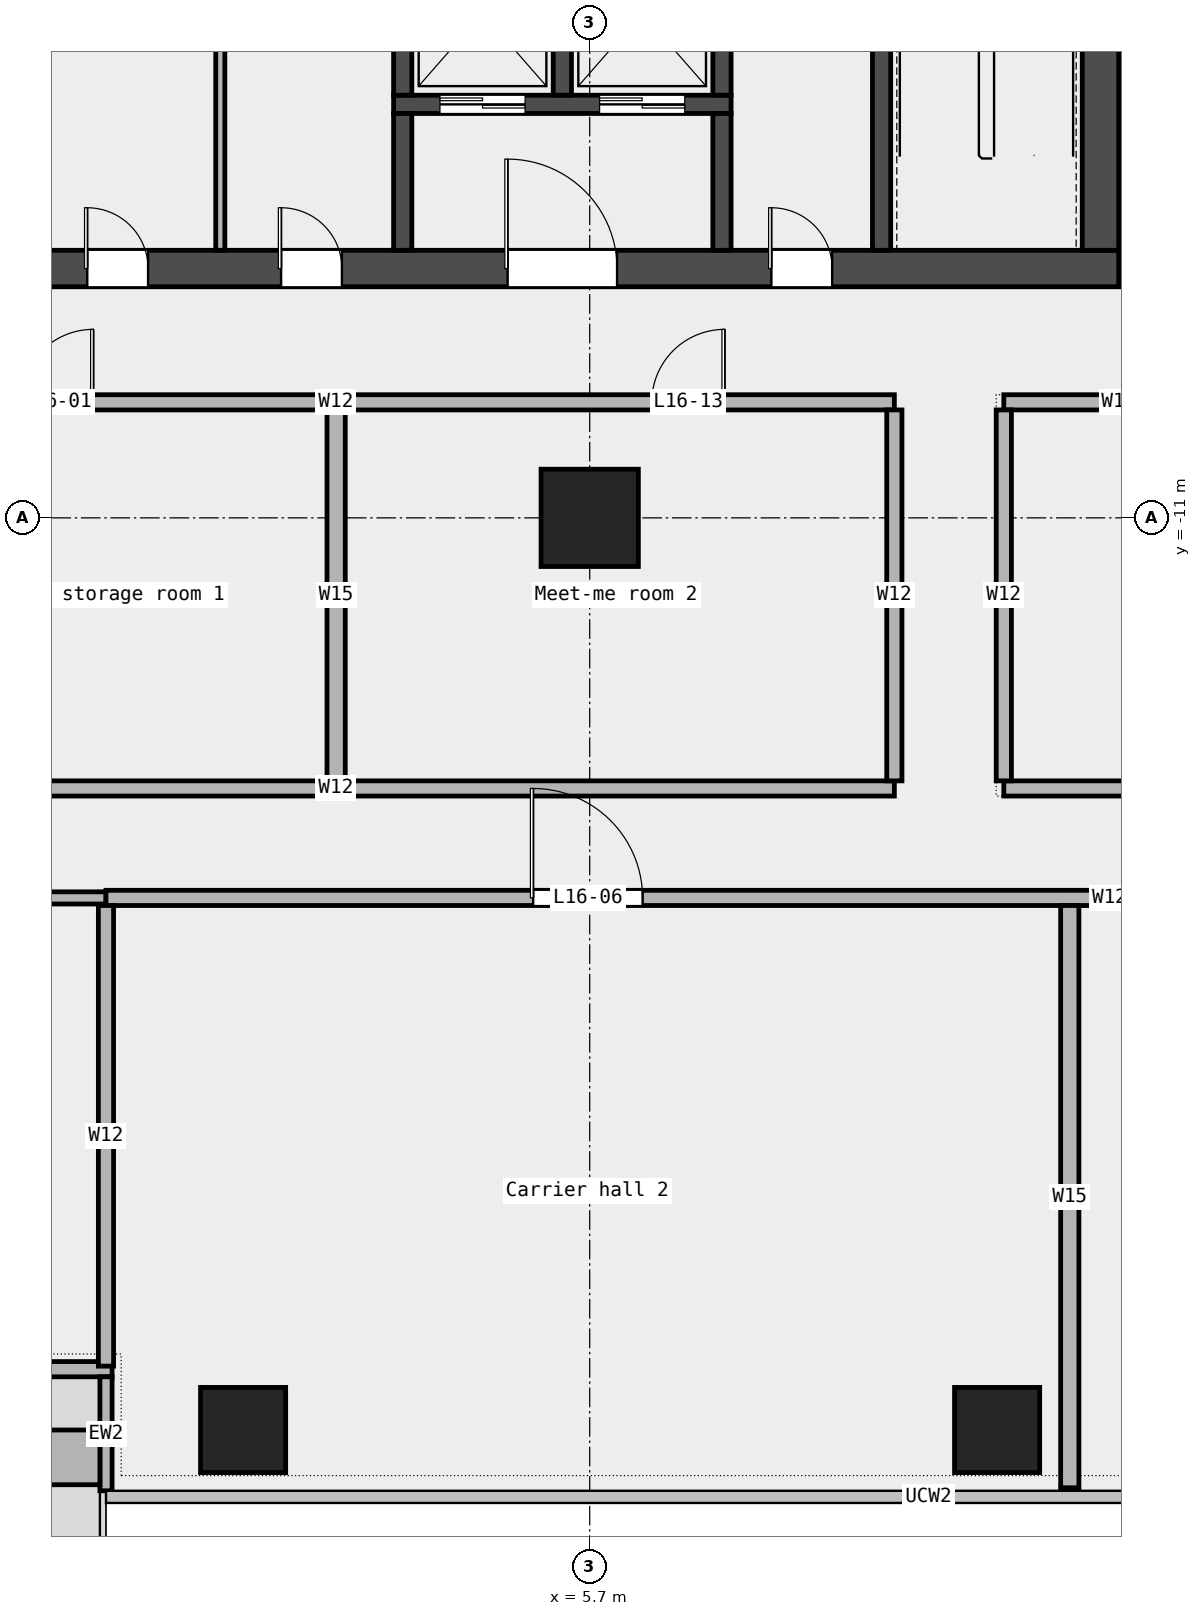
"""IFC4 building model, lengths in metres.
Left out: names, types, materials, properties, quantities, classifications, styles, units other than length and angle.
Written with IfcOpenShell. Run it as: python <this file> out.ifc"""

import sys

from ifc_helpers import new_model, si_unit, direction, frame, frame_2d, origin, origin_2d, place, context, subcontext, project, spatial, rectangle, extrude, element, fill, save


model = new_model("IFC4")
c1 = context("Model", 3, precision=1e-05, world=origin(), true_north=direction((0.0, 1.0)))
c2 = subcontext(c1, "Body", "Model", "MODEL_VIEW")
j1 = project(units=[si_unit("LENGTHUNIT", "METRE"), si_unit("PLANEANGLEUNIT", "RADIAN")], contexts=[c1])
p1 = place(None, origin())
s1 = spatial("IfcSite", under=j1, at=p1, CompositionType="ELEMENT")
p2 = place(p1, origin())
s2 = spatial("IfcBuilding", under=s1, at=p2, CompositionType="ELEMENT")
p3 = place(p2, frame((0.0, 0.0, 83.8)))
s3 = spatial("IfcBuildingStorey", under=s2, at=p3, CompositionType="ELEMENT", Elevation=83.8)
for number, where, z_axis, x_axis in (
    (1, (0.0, -26.0, 0.0), (0.0, 0.0, 1.0), (1.0, 0.0, 0.0)),
    (2, (12.4, -26.0, 0.0), (0.0, 0.0, 1.0), (1.0, 0.0, 0.0)),
):
    element("IfcColumn", number, at=place(p3, frame(where, z_axis=z_axis, x_axis=x_axis)), inside=s3, PredefinedType="COLUMN", context=c2, shape_type="SweptSolid", body=[
        extrude(rectangle(XDim=1.4, YDim=1.4, at=origin_2d()), origin(), (0.0, 0.0, 1.0), 4.2),
    ])
p4 = place(p3, frame((5.7, -11.0, 0.0), z_axis=(0.0, 0.0, 1.0), x_axis=(1.0, 0.0, 0.0)))
e3 = element("IfcColumn", 3, at=p4, inside=s3, PredefinedType="COLUMN", context=c2, shape_type="SweptSolid", body=[
    extrude(rectangle(XDim=1.6, YDim=1.6, at=origin_2d()), origin(), (0.0, 0.0, 1.0), 4.2),
])
p5 = place(p3, frame((-15.882, -25.0, 0.0), z_axis=(0.0, 0.0, 1.0), x_axis=(1.0, 0.0, 0.0)))
e4 = element("IfcWall", 4, at=p5, inside=s3, PredefinedType="STANDARD", context=c2, shape_type="SweptSolid", body=[
    extrude(rectangle(XDim=13.727, YDim=0.25, at=frame_2d((6.864, 0.0))), origin(), (0.0, 0.0, 1.0), 4.2),
])
p6 = place(p5, frame((1.0, 0.0, 0.45)))
e5 = element("IfcOpeningElement", 5, at=p6, cuts=e4, PredefinedType="OPENING", context=c2, shape_type="SweptSolid", body=[
    extrude(rectangle(XDim=1.5, YDim=3.0, at=frame_2d((0.75, 1.5))), frame((0.0, 0.137, 0.0), z_axis=(0.0, -1.0, 0.0), x_axis=(1.0, 0.0, 0.0)), (0.0, 0.0, 1.0), 0.274),
])
p7 = place(p5, frame((6.0, 0.0, 0.0)))
e6 = element("IfcOpeningElement", 6, at=p7, cuts=e4, PredefinedType="OPENING", context=c2, shape_type="SweptSolid", body=[
    extrude(rectangle(XDim=1.8, YDim=2.4, at=frame_2d((0.9, 1.2))), frame((0.0, 0.137, 0.0), z_axis=(0.0, -1.0, 0.0), x_axis=(1.0, 0.0, 0.0)), (0.0, 0.0, 1.0), 0.274),
])
p8 = place(p5, frame((10.5, 0.0, 0.45)))
e7 = element("IfcOpeningElement", 7, at=p8, cuts=e4, PredefinedType="OPENING", context=c2, shape_type="SweptSolid", body=[
    extrude(rectangle(XDim=1.5, YDim=3.0, at=frame_2d((0.75, 1.5))), frame((0.0, 0.137, 0.0), z_axis=(0.0, -1.0, 0.0), x_axis=(1.0, 0.0, 0.0)), (0.0, 0.0, 1.0), 0.274),
])
p9 = place(p3, frame((-2.255, -27.0, 0.0), z_axis=(0.0, 0.0, 1.0), x_axis=(0.0, 1.0, 0.0)))
e8 = element("IfcWall", 8, at=p9, inside=s3, PredefinedType="STANDARD", context=c2, shape_type="SweptSolid", body=[
    extrude(rectangle(XDim=1.875, YDim=0.2, at=frame_2d((0.938, 0.0))), origin(), (0.0, 0.0, 1.0), 4.2),
])
p10 = place(p3, frame((-5.955, -26.45, 0.0), z_axis=(0.0, 0.0, 1.0), x_axis=(1.0, 0.0, 0.0)))
e9 = element("IfcWall", 9, at=p10, inside=s3, PredefinedType="STANDARD", context=c2, shape_type="SweptSolid", body=[
    extrude(rectangle(XDim=3.6, YDim=0.9, at=frame_2d((1.8, 0.0))), origin(), (0.0, 0.0, 1.0), 0.7),
])
p11 = place(p3, frame((-15.78, -17.25, 0.0), z_axis=(0.0, 0.0, 1.0), x_axis=(1.0, 0.0, 0.0)))
e10 = element("IfcWall", 10, at=p11, inside=s3, PredefinedType="PARTITIONING", context=c2, shape_type="SweptSolid", body=[
    extrude(rectangle(XDim=13.525, YDim=0.2, at=frame_2d((6.763, 0.0))), origin(), (0.0, 0.0, 1.0), 4.2),
])
p12 = place(p11, frame((6.012, 0.0, 0.0)))
e11 = element("IfcOpeningElement", 11, at=p12, cuts=e10, PredefinedType="OPENING", context=c2, shape_type="SweptSolid", body=[
    extrude(rectangle(XDim=1.5, YDim=2.1, at=frame_2d((0.75, 1.05))), frame((0.0, 0.112, 0.0), z_axis=(0.0, -1.0, 0.0), x_axis=(1.0, 0.0, 0.0)), (0.0, 0.0, 1.0), 0.224),
])
p13 = place(p3, frame((-2.255, -17.25, 0.0), z_axis=(0.0, 0.0, 1.0), x_axis=(1.0, 0.0, 0.0)))
e12 = element("IfcWall", 12, at=p13, inside=s3, PredefinedType="PARTITIONING", context=c2, shape_type="SweptSolid", body=[
    extrude(rectangle(XDim=33.005, YDim=0.25, at=frame_2d((16.502, 0.0))), origin(), (0.0, 0.0, 1.0), 4.2),
])
p14 = place(p13, frame((7.025, 0.0, 0.0)))
e13 = element("IfcOpeningElement", 13, at=p14, cuts=e12, PredefinedType="OPENING", context=c2, shape_type="SweptSolid", body=[
    extrude(rectangle(XDim=1.8, YDim=2.1, at=frame_2d((0.9, 1.05))), frame((0.0, 0.137, 0.0), z_axis=(0.0, -1.0, 0.0), x_axis=(1.0, 0.0, 0.0)), (0.0, 0.0, 1.0), 0.274),
])
p15 = place(p13, frame((23.427, 0.0, 0.0)))
e14 = element("IfcOpeningElement", 14, at=p15, cuts=e12, PredefinedType="OPENING", context=c2, shape_type="SweptSolid", body=[
    extrude(rectangle(XDim=1.8, YDim=2.1, at=frame_2d((0.9, 1.05))), frame((0.0, 0.137, 0.0), z_axis=(0.0, -1.0, 0.0), x_axis=(1.0, 0.0, 0.0)), (0.0, 0.0, 1.0), 0.274),
])
p16 = place(p3, frame((-7.655, -15.45, 0.0), z_axis=(0.0, 0.0, 1.0), x_axis=(1.0, 0.0, 0.0)))
e15 = element("IfcWall", 15, at=p16, inside=s3, PredefinedType="PARTITIONING", context=c2, shape_type="SweptSolid", body=[
    extrude(rectangle(XDim=18.365, YDim=0.25, at=frame_2d((9.183, 0.0))), origin(), (0.0, 0.0, 1.0), 4.2),
])
p17 = place(p3, frame((12.51, -15.45, 0.0), z_axis=(0.0, 0.0, 1.0), x_axis=(1.0, 0.0, 0.0)))
e16 = element("IfcWall", 16, at=p17, inside=s3, PredefinedType="PARTITIONING", context=c2, shape_type="SweptSolid", body=[
    extrude(rectangle(XDim=18.24, YDim=0.25, at=frame_2d((9.12, 0.0))), origin(), (0.0, 0.0, 1.0), 4.2),
])
p18 = place(p17, frame((12.93, 0.0, 0.0)))
e17 = element("IfcOpeningElement", 17, at=p18, cuts=e16, PredefinedType="OPENING", context=c2, shape_type="SweptSolid", body=[
    extrude(rectangle(XDim=1.2, YDim=2.1, at=frame_2d((0.6, 1.05))), frame((0.0, 0.137, 0.0), z_axis=(0.0, -1.0, 0.0), x_axis=(1.0, 0.0, 0.0)), (0.0, 0.0, 1.0), 0.274),
])
p19 = place(p17, frame((3.91, 0.0, 0.0)))
e18 = element("IfcOpeningElement", 18, at=p19, cuts=e16, PredefinedType="OPENING", context=c2, shape_type="SweptSolid", body=[
    extrude(rectangle(XDim=1.2, YDim=2.1, at=frame_2d((0.6, 1.05))), frame((0.0, 0.137, 0.0), z_axis=(0.0, -1.0, 0.0), x_axis=(1.0, 0.0, 0.0)), (0.0, 0.0, 1.0), 0.274),
])
p20 = place(p3, frame((-7.655, -9.1, 0.0), z_axis=(0.0, 0.0, 1.0), x_axis=(1.0, 0.0, 0.0)))
e19 = element("IfcWall", 19, at=p20, inside=s3, PredefinedType="PARTITIONING", context=c2, shape_type="SweptSolid", body=[
    extrude(rectangle(XDim=18.365, YDim=0.25, at=frame_2d((9.183, 0.0))), origin(), (0.0, 0.0, 1.0), 4.2),
])
p21 = place(p20, frame((3.992, 0.0, 0.0)))
e20 = element("IfcOpeningElement", 20, at=p21, cuts=e19, PredefinedType="OPENING", context=c2, shape_type="SweptSolid", body=[
    extrude(rectangle(XDim=1.2, YDim=2.1, at=frame_2d((0.6, 1.05))), frame((0.0, 0.137, 0.0), z_axis=(0.0, -1.0, 0.0), x_axis=(1.0, 0.0, 0.0)), (0.0, 0.0, 1.0), 0.274),
])
p22 = place(p20, frame((14.375, 0.0, 0.0)))
e21 = element("IfcOpeningElement", 21, at=p22, cuts=e19, PredefinedType="OPENING", context=c2, shape_type="SweptSolid", body=[
    extrude(rectangle(XDim=1.2, YDim=2.1, at=frame_2d((0.6, 1.05))), frame((0.0, 0.137, 0.0), z_axis=(0.0, -1.0, 0.0), x_axis=(1.0, 0.0, 0.0)), (0.0, 0.0, 1.0), 0.274),
])
p23 = place(p3, frame((12.51, -9.1, 0.0), z_axis=(0.0, 0.0, 1.0), x_axis=(1.0, 0.0, 0.0)))
e22 = element("IfcWall", 22, at=p23, inside=s3, PredefinedType="PARTITIONING", context=c2, shape_type="SweptSolid", body=[
    extrude(rectangle(XDim=3.79, YDim=0.25, at=frame_2d((1.895, 0.0))), origin(), (0.0, 0.0, 1.0), 4.2),
])
p24 = place(p3, frame((-2.255, -24.95, 0.0), z_axis=(0.0, 0.0, 1.0), x_axis=(0.0, 1.0, 0.0)))
e23 = element("IfcWall", 23, at=p24, inside=s3, PredefinedType="PARTITIONING", context=c2, shape_type="SweptSolid", body=[
    extrude(rectangle(XDim=7.575, YDim=0.25, at=frame_2d((3.788, 0.0))), origin(), (0.0, 0.0, 1.0), 4.2),
])
p25 = place(p3, frame((1.53, -15.325, 0.0), z_axis=(0.0, 0.0, 1.0), x_axis=(0.0, 1.0, 0.0)))
e24 = element("IfcWall", 24, at=p25, inside=s3, PredefinedType="PARTITIONING", context=c2, shape_type="SweptSolid", body=[
    extrude(rectangle(XDim=6.1, YDim=0.3, at=frame_2d((3.05, 0.0))), origin(), (0.0, 0.0, 1.0), 4.2),
])
for number, where, z_axis, x_axis in (
    (25, (10.71, -15.325, 0.0), (0.0, 0.0, 1.0), (0.0, 1.0, 0.0)),
    (26, (12.51, -15.325, 0.0), (0.0, 0.0, 1.0), (0.0, 1.0, 0.0)),
):
    element("IfcWall", number, at=place(p3, frame(where, z_axis=z_axis, x_axis=x_axis)), inside=s3, PredefinedType="PARTITIONING", context=c2, shape_type="SweptSolid", body=[
        extrude(rectangle(XDim=6.1, YDim=0.25, at=frame_2d((3.05, 0.0))), origin(), (0.0, 0.0, 1.0), 4.2),
    ])
p26 = place(p3, frame((13.595, -26.95, 0.0), z_axis=(0.0, 0.0, 1.0), x_axis=(0.0, 1.0, 0.0)))
e27 = element("IfcWall", 27, at=p26, inside=s3, PredefinedType="PARTITIONING", context=c2, shape_type="SweptSolid", body=[
    extrude(rectangle(XDim=9.575, YDim=0.3, at=frame_2d((4.788, 0.0))), origin(), (0.0, 0.0, 1.0), 4.2),
])
p27 = place(p3, frame((-14.4, -6.9, 0.0), z_axis=(0.0, 0.0, 1.0), x_axis=(1.0, 0.0, 0.0)))
e28 = element("IfcWall", 28, at=p27, inside=s3, PredefinedType="SHEAR", context=c2, shape_type="SweptSolid", body=[
    extrude(rectangle(XDim=28.8, YDim=0.6, at=frame_2d((14.4, 0.0))), origin(), (0.0, 0.0, 1.0), 4.5),
])
p28 = place(p27, frame((6.675, 0.0, 0.0)))
e29 = element("IfcOpeningElement", 29, at=p28, cuts=e28, PredefinedType="OPENING", context=c2, shape_type="SweptSolid", body=[
    extrude(rectangle(XDim=1.2, YDim=2.1, at=frame_2d((0.6, 1.05))), frame((0.0, 0.312, 0.0), z_axis=(0.0, -1.0, 0.0), x_axis=(1.0, 0.0, 0.0)), (0.0, 0.0, 1.0), 0.624),
])
p29 = place(p27, frame((11.837, 0.0, 0.0)))
e30 = element("IfcOpeningElement", 30, at=p29, cuts=e28, PredefinedType="OPENING", context=c2, shape_type="SweptSolid", body=[
    extrude(rectangle(XDim=1.0, YDim=2.1, at=frame_2d((0.5, 1.05))), frame((0.0, 0.312, 0.0), z_axis=(0.0, -1.0, 0.0), x_axis=(1.0, 0.0, 0.0)), (0.0, 0.0, 1.0), 0.624),
])
p30 = place(p27, frame((15.025, 0.0, 0.0)))
e31 = element("IfcOpeningElement", 31, at=p30, cuts=e28, PredefinedType="OPENING", context=c2, shape_type="SweptSolid", body=[
    extrude(rectangle(XDim=1.0, YDim=2.1, at=frame_2d((0.5, 1.05))), frame((0.0, 0.312, 0.0), z_axis=(0.0, -1.0, 0.0), x_axis=(1.0, 0.0, 0.0)), (0.0, 0.0, 1.0), 0.624),
])
p31 = place(p27, frame((18.75, 0.0, 0.0)))
e32 = element("IfcOpeningElement", 32, at=p31, cuts=e28, PredefinedType="OPENING", context=c2, shape_type="SweptSolid", body=[
    extrude(rectangle(XDim=1.8, YDim=2.1, at=frame_2d((0.9, 1.05))), frame((0.0, 0.312, 0.0), z_axis=(0.0, -1.0, 0.0), x_axis=(1.0, 0.0, 0.0)), (0.0, 0.0, 1.0), 0.624),
])
p32 = place(p27, frame((23.087, 0.0, 0.0)))
e33 = element("IfcOpeningElement", 33, at=p32, cuts=e28, PredefinedType="OPENING", context=c2, shape_type="SweptSolid", body=[
    extrude(rectangle(XDim=1.0, YDim=2.1, at=frame_2d((0.5, 1.05))), frame((0.0, 0.312, 0.0), z_axis=(0.0, -1.0, 0.0), x_axis=(1.0, 0.0, 0.0)), (0.0, 0.0, 1.0), 0.624),
])
p33 = place(p3, frame((14.1, -6.6, 0.0), z_axis=(0.0, 0.0, 1.0), x_axis=(0.0, 1.0, 0.0)))
e34 = element("IfcWall", 34, at=p33, inside=s3, PredefinedType="SHEAR", context=c2, shape_type="SweptSolid", body=[
    extrude(rectangle(XDim=19.5, YDim=0.6, at=frame_2d((9.75, 0.0))), origin(), (0.0, 0.0, 1.0), 4.5),
])
p34 = place(p33, frame((9.3, 0.0, 0.0)))
e35 = element("IfcOpeningElement", 35, at=p34, cuts=e34, PredefinedType="OPENING", context=c2, shape_type="SweptSolid", body=[
    extrude(rectangle(XDim=1.8, YDim=2.1, at=frame_2d((0.9, 1.05))), frame((0.0, 0.312, 0.0), z_axis=(0.0, -1.0, 0.0), x_axis=(1.0, 0.0, 0.0)), (0.0, 0.0, 1.0), 0.624),
])
p35 = place(p3, frame((10.5, -6.6, 0.0), z_axis=(0.0, 0.0, 1.0), x_axis=(0.0, 1.0, 0.0)))
e36 = element("IfcWall", 36, at=p35, inside=s3, PredefinedType="SHEAR", context=c2, shape_type="SweptSolid", body=[
    extrude(rectangle(XDim=8.55, YDim=0.3, at=frame_2d((4.275, 0.0))), origin(), (0.0, 0.0, 1.0), 4.5),
])
p36 = place(p3, frame((2.475, -4.2, 0.0), z_axis=(0.0, 0.0, 1.0), x_axis=(1.0, 0.0, 0.0)))
e37 = element("IfcWall", 37, at=p36, inside=s3, PredefinedType="SOLIDWALL", context=c2, shape_type="SweptSolid", body=[
    extrude(rectangle(XDim=5.55, YDim=0.3, at=frame_2d((2.775, 0.0))), origin(), (0.0, 0.0, 1.0), 4.5),
])
p37 = place(p36, frame((0.762, 0.0, 0.0)))
e38 = element("IfcOpeningElement", 38, at=p37, cuts=e37, PredefinedType="OPENING", context=c2, shape_type="SweptSolid", body=[
    extrude(rectangle(XDim=1.4, YDim=2.1, at=frame_2d((0.7, 1.05))), frame((0.0, 0.162, 0.0), z_axis=(0.0, -1.0, 0.0), x_axis=(1.0, 0.0, 0.0)), (0.0, 0.0, 1.0), 0.324),
])
p38 = place(p36, frame((3.387, 0.0, 0.0)))
e39 = element("IfcOpeningElement", 39, at=p38, cuts=e37, PredefinedType="OPENING", context=c2, shape_type="SweptSolid", body=[
    extrude(rectangle(XDim=1.4, YDim=2.1, at=frame_2d((0.7, 1.05))), frame((0.0, 0.162, 0.0), z_axis=(0.0, -1.0, 0.0), x_axis=(1.0, 0.0, 0.0)), (0.0, 0.0, 1.0), 0.324),
])
p39 = place(p3, frame((2.625, -4.05, 0.0), z_axis=(0.0, 0.0, 1.0), x_axis=(0.0, 1.0, 0.0)))
e40 = element("IfcWall", 40, at=p39, inside=s3, PredefinedType="SOLIDWALL", context=c2, shape_type="SweptSolid", body=[
    extrude(rectangle(XDim=2.7, YDim=0.3, at=frame_2d((1.35, 0.0))), origin(), (0.0, 0.0, 1.0), 4.5),
])
p40 = place(p3, frame((2.625, -6.6, 0.0), z_axis=(0.0, 0.0, 1.0), x_axis=(0.0, 1.0, 0.0)))
e41 = element("IfcWall", 41, at=p40, inside=s3, PredefinedType="SOLIDWALL", context=c2, shape_type="SweptSolid", body=[
    extrude(rectangle(XDim=2.25, YDim=0.3, at=frame_2d((1.125, 0.0))), origin(), (0.0, 0.0, 1.0), 4.5),
])
for number, where, z_axis, x_axis in (
    (42, (5.25, -4.05, 0.0), (0.0, 0.0, 1.0), (0.0, 1.0, 0.0)),
    (43, (7.875, -4.05, 0.0), (0.0, 0.0, 1.0), (0.0, 1.0, 0.0)),
):
    element("IfcWall", number, at=place(p3, frame(where, z_axis=z_axis, x_axis=x_axis)), inside=s3, PredefinedType="SOLIDWALL", context=c2, shape_type="SweptSolid", body=[
        extrude(rectangle(XDim=2.7, YDim=0.3, at=frame_2d((1.35, 0.0))), origin(), (0.0, 0.0, 1.0), 4.5),
    ])
p41 = place(p3, frame((7.875, -6.6, 0.0), z_axis=(0.0, 0.0, 1.0), x_axis=(0.0, 1.0, 0.0)))
e44 = element("IfcWall", 44, at=p41, inside=s3, PredefinedType="SOLIDWALL", context=c2, shape_type="SweptSolid", body=[
    extrude(rectangle(XDim=2.25, YDim=0.3, at=frame_2d((1.125, 0.0))), origin(), (0.0, 0.0, 1.0), 4.5),
])
p42 = place(p3, frame((-0.375, -6.6, 0.0), z_axis=(0.0, 0.0, 1.0), x_axis=(0.0, 1.0, 0.0)))
e45 = element("IfcWall", 45, at=p42, inside=s3, PredefinedType="PARTITIONING", context=c2, shape_type="SweptSolid", body=[
    extrude(rectangle(XDim=5.25, YDim=0.15, at=frame_2d((2.625, 0.0))), origin(), (0.0, 0.0, 1.0), 4.5),
])
p43 = place(p21, origin())
e46 = element("IfcDoor", 46, at=p43, inside=s3, OperationType="SINGLE_SWING_RIGHT", PredefinedType="DOOR", context=c2, shape_type="SweptSolid", body=[
    extrude(rectangle(XDim=1.2, YDim=2.1, at=frame_2d((0.6, 1.05))), frame((0.0, 0.025, 0.0), z_axis=(0.0, -1.0, 0.0), x_axis=(1.0, 0.0, 0.0)), (0.0, 0.0, 1.0), 0.05),
])
fill(e20, e46)
p44 = place(p14, origin())
e47 = element("IfcDoor", 47, at=p44, inside=s3, OperationType="DOUBLE_DOOR_SINGLE_SWING", PredefinedType="DOOR", context=c2, shape_type="SweptSolid", body=[
    extrude(rectangle(XDim=1.8, YDim=2.1, at=frame_2d((0.9, 1.05))), frame((0.0, 0.025, 0.0), z_axis=(0.0, -1.0, 0.0), x_axis=(1.0, 0.0, 0.0)), (0.0, 0.0, 1.0), 0.05),
])
fill(e13, e47)
p45 = place(p22, origin())
e48 = element("IfcDoor", 48, at=p45, inside=s3, OperationType="SINGLE_SWING_RIGHT", PredefinedType="DOOR", context=c2, shape_type="SweptSolid", body=[
    extrude(rectangle(XDim=1.2, YDim=2.1, at=frame_2d((0.6, 1.05))), frame((0.0, 0.025, 0.0), z_axis=(0.0, -1.0, 0.0), x_axis=(1.0, 0.0, 0.0)), (0.0, 0.0, 1.0), 0.05),
])
fill(e21, e48)
p46 = place(p37, origin())
e49 = element("IfcDoor", 49, at=p46, inside=s3, OperationType="DOUBLE_DOOR_SLIDING", PredefinedType="DOOR", context=c2, shape_type="SweptSolid", body=[
    extrude(rectangle(XDim=1.4, YDim=2.1, at=frame_2d((0.7, 1.05))), frame((0.0, 0.025, 0.0), z_axis=(0.0, -1.0, 0.0), x_axis=(1.0, 0.0, 0.0)), (0.0, 0.0, 1.0), 0.05),
])
fill(e38, e49)
p47 = place(p38, origin())
e50 = element("IfcDoor", 50, at=p47, inside=s3, OperationType="DOUBLE_DOOR_SLIDING", PredefinedType="DOOR", context=c2, shape_type="SweptSolid", body=[
    extrude(rectangle(XDim=1.4, YDim=2.1, at=frame_2d((0.7, 1.05))), frame((0.0, 0.025, 0.0), z_axis=(0.0, -1.0, 0.0), x_axis=(1.0, 0.0, 0.0)), (0.0, 0.0, 1.0), 0.05),
])
fill(e39, e50)
p48 = place(p29, origin())
e51 = element("IfcDoor", 51, at=p48, inside=s3, OperationType="SINGLE_SWING_LEFT", PredefinedType="DOOR", context=c2, shape_type="SweptSolid", body=[
    extrude(rectangle(XDim=1.0, YDim=2.1, at=frame_2d((0.5, 1.05))), frame((0.0, 0.025, 0.0), z_axis=(0.0, -1.0, 0.0), x_axis=(1.0, 0.0, 0.0)), (0.0, 0.0, 1.0), 0.05),
])
fill(e30, e51)
p49 = place(p30, origin())
e52 = element("IfcDoor", 52, at=p49, inside=s3, OperationType="SINGLE_SWING_LEFT", PredefinedType="DOOR", context=c2, shape_type="SweptSolid", body=[
    extrude(rectangle(XDim=1.0, YDim=2.1, at=frame_2d((0.5, 1.05))), frame((0.0, 0.025, 0.0), z_axis=(0.0, -1.0, 0.0), x_axis=(1.0, 0.0, 0.0)), (0.0, 0.0, 1.0), 0.05),
])
fill(e31, e52)
p50 = place(p31, origin())
e53 = element("IfcDoor", 53, at=p50, inside=s3, OperationType="DOUBLE_DOOR_SINGLE_SWING", PredefinedType="DOOR", context=c2, shape_type="SweptSolid", body=[
    extrude(rectangle(XDim=1.8, YDim=2.1, at=frame_2d((0.9, 1.05))), frame((0.0, 0.025, 0.0), z_axis=(0.0, -1.0, 0.0), x_axis=(1.0, 0.0, 0.0)), (0.0, 0.0, 1.0), 0.05),
])
fill(e32, e53)
p51 = place(p32, origin())
e54 = element("IfcDoor", 54, at=p51, inside=s3, OperationType="SINGLE_SWING_LEFT", PredefinedType="DOOR", context=c2, shape_type="SweptSolid", body=[
    extrude(rectangle(XDim=1.0, YDim=2.1, at=frame_2d((0.5, 1.05))), frame((0.0, 0.025, 0.0), z_axis=(0.0, -1.0, 0.0), x_axis=(1.0, 0.0, 0.0)), (0.0, 0.0, 1.0), 0.05),
])
fill(e33, e54)
save(model, sys.argv[1])
